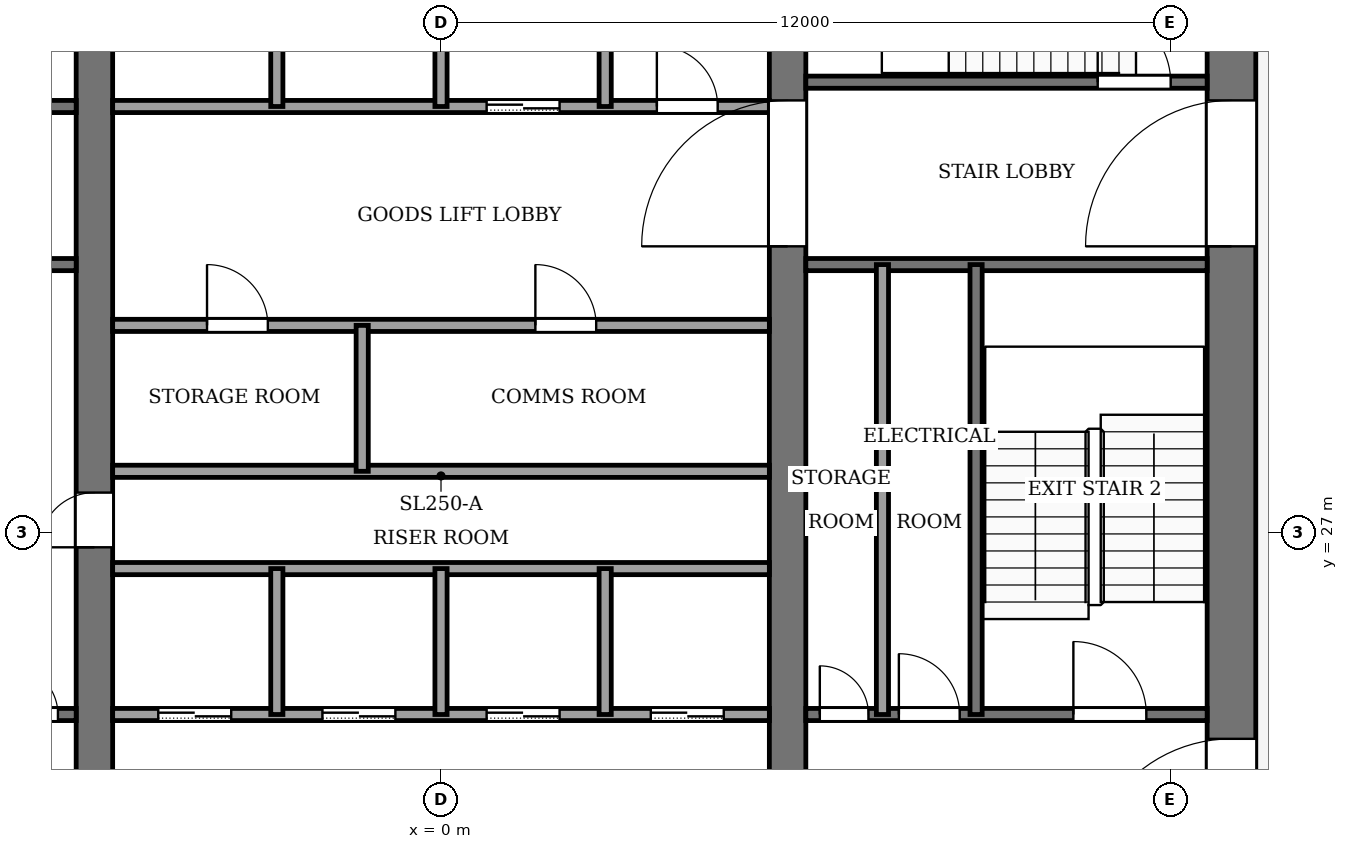
"""IFC4 building model, lengths in metres.
Left out: names, types, materials, properties, quantities, classifications, styles, units other than length and angle.
Written with IfcOpenShell. Run it as: python <this file> out.ifc"""

import sys

from ifc_helpers import new_model, si_unit, direction, frame, frame_2d, origin, place, context, subcontext, project, spatial, rectangle, extrude, element, fill, save


model = new_model("IFC4")
c1 = context("Model", 3, precision=1e-05, world=origin(), true_north=direction((0.0, 1.0)))
c2 = subcontext(c1, "Body", "Model", "MODEL_VIEW")
j1 = project(units=[si_unit("LENGTHUNIT", "METRE"), si_unit("PLANEANGLEUNIT", "RADIAN")], contexts=[c1])
p1 = place(None, origin())
s1 = spatial("IfcSite", under=j1, at=p1, CompositionType="ELEMENT")
p2 = place(p1, origin())
s2 = spatial("IfcBuilding", under=s1, at=p2, CompositionType="ELEMENT")
p3 = place(p2, frame((0.0, 0.0, 254.0)))
s3 = spatial("IfcBuildingStorey", under=s2, at=p3, CompositionType="ELEMENT", Elevation=254.0)
p4 = place(p3, frame((13.0, 18.4, -0.13), z_axis=(0.0, 0.0, 1.0), x_axis=(0.0, 1.0, 0.0)))
e1 = element("IfcWall", 1, at=p4, inside=s3, PredefinedType="SHEAR", context=c2, shape_type="SweptSolid", body=[
    extrude(rectangle(XDim=19.2, YDim=0.8, at=frame_2d((9.6, 0.0))), origin(), (0.0, 0.0, 1.0), 4.0),
])
p5 = place(p4, frame((2.8, 0.0, 0.13)))
e2 = element("IfcOpeningElement", 2, at=p5, cuts=e1, PredefinedType="OPENING", context=c2, shape_type="SweptSolid", body=[
    extrude(rectangle(XDim=2.4, YDim=2.4, at=frame_2d((1.2, 1.2))), frame((0.0, 0.41, 0.0), z_axis=(0.0, -1.0, 0.0), x_axis=(1.0, 0.0, 0.0)), (0.0, 0.0, 1.0), 0.82),
])
p6 = place(p4, frame((13.3, 0.0, 0.13)))
e3 = element("IfcOpeningElement", 3, at=p6, cuts=e1, PredefinedType="OPENING", context=c2, shape_type="SweptSolid", body=[
    extrude(rectangle(XDim=2.4, YDim=2.4, at=frame_2d((1.2, 1.2))), frame((0.0, 0.41, 0.0), z_axis=(0.0, -1.0, 0.0), x_axis=(1.0, 0.0, 0.0)), (0.0, 0.0, 1.0), 0.82),
])
p7 = place(p3, frame((-5.7, 18.4, -0.13), z_axis=(0.0, 0.0, 1.0), x_axis=(0.0, 1.0, 0.0)))
e4 = element("IfcWall", 4, at=p7, inside=s3, PredefinedType="SHEAR", context=c2, shape_type="SweptSolid", body=[
    extrude(rectangle(XDim=19.2, YDim=0.6, at=frame_2d((9.6, 0.0))), origin(), (0.0, 0.0, 1.0), 4.0),
])
p8 = place(p7, frame((8.35, 0.0, 0.13)))
e5 = element("IfcOpeningElement", 5, at=p8, cuts=e4, PredefinedType="OPENING", context=c2, shape_type="SweptSolid", body=[
    extrude(rectangle(XDim=0.9, YDim=2.1, at=frame_2d((0.45, 1.05))), frame((0.0, 0.31, 0.0), z_axis=(0.0, -1.0, 0.0), x_axis=(1.0, 0.0, 0.0)), (0.0, 0.0, 1.0), 0.62),
])
p9 = place(p3, frame((5.7, 18.4, -0.13), z_axis=(0.0, 0.0, 1.0), x_axis=(0.0, 1.0, 0.0)))
e6 = element("IfcWall", 6, at=p9, inside=s3, PredefinedType="SHEAR", context=c2, shape_type="SweptSolid", body=[
    extrude(rectangle(XDim=19.2, YDim=0.6, at=frame_2d((9.6, 0.0))), origin(), (0.0, 0.0, 1.0), 4.0),
])
p10 = place(p9, frame((13.3, 0.0, 0.13)))
e7 = element("IfcOpeningElement", 7, at=p10, cuts=e6, PredefinedType="OPENING", context=c2, shape_type="SweptSolid", body=[
    extrude(rectangle(XDim=2.4, YDim=2.4, at=frame_2d((1.2, 1.2))), frame((0.0, 0.31, 0.0), z_axis=(0.0, -1.0, 0.0), x_axis=(1.0, 0.0, 0.0)), (0.0, 0.0, 1.0), 0.62),
])
p11 = place(p3, frame((-12.6, 24.0, 0.0), z_axis=(0.0, 0.0, 1.0), x_axis=(1.0, 0.0, 0.0)))
e8 = element("IfcWall", 8, at=p11, inside=s3, PredefinedType="PARTITIONING", context=c2, shape_type="SweptSolid", body=[
    extrude(rectangle(XDim=6.6, YDim=0.2, at=frame_2d((3.3, 0.0))), origin(), (0.0, 0.0, 1.0), 3.87),
])
p12 = place(p11, frame((4.1, 0.0, 0.0)))
e9 = element("IfcOpeningElement", 9, at=p12, cuts=e8, PredefinedType="OPENING", context=c2, shape_type="SweptSolid", body=[
    extrude(rectangle(XDim=0.8, YDim=2.1, at=frame_2d((0.4, 1.05))), frame((0.0, 0.11, 0.0), z_axis=(0.0, -1.0, 0.0), x_axis=(1.0, 0.0, 0.0)), (0.0, 0.0, 1.0), 0.22),
])
p13 = place(p11, frame((5.5, 0.0, 0.0)))
e10 = element("IfcOpeningElement", 10, at=p13, cuts=e8, PredefinedType="OPENING", context=c2, shape_type="SweptSolid", body=[
    extrude(rectangle(XDim=0.8, YDim=2.1, at=frame_2d((0.4, 1.05))), frame((0.0, 0.11, 0.0), z_axis=(0.0, -1.0, 0.0), x_axis=(1.0, 0.0, 0.0)), (0.0, 0.0, 1.0), 0.22),
])
p14 = place(p3, frame((-5.4, 24.0, 0.0), z_axis=(0.0, 0.0, 1.0), x_axis=(1.0, 0.0, 0.0)))
e11 = element("IfcWall", 11, at=p14, inside=s3, PredefinedType="PARTITIONING", context=c2, shape_type="SweptSolid", body=[
    extrude(rectangle(XDim=10.8, YDim=0.2, at=frame_2d((5.4, 0.0))), origin(), (0.0, 0.0, 1.0), 3.87),
])
p15 = place(p14, frame((0.75, 0.0, 0.0)))
e12 = element("IfcOpeningElement", 12, at=p15, cuts=e11, PredefinedType="OPENING", context=c2, shape_type="SweptSolid", body=[
    extrude(rectangle(XDim=1.2, YDim=2.2, at=frame_2d((0.6, 1.1))), frame((0.0, 0.11, 0.0), z_axis=(0.0, -1.0, 0.0), x_axis=(1.0, 0.0, 0.0)), (0.0, 0.0, 1.0), 0.22),
])
p16 = place(p14, frame((3.45, 0.0, 0.0)))
e13 = element("IfcOpeningElement", 13, at=p16, cuts=e11, PredefinedType="OPENING", context=c2, shape_type="SweptSolid", body=[
    extrude(rectangle(XDim=1.2, YDim=2.2, at=frame_2d((0.6, 1.1))), frame((0.0, 0.11, 0.0), z_axis=(0.0, -1.0, 0.0), x_axis=(1.0, 0.0, 0.0)), (0.0, 0.0, 1.0), 0.22),
])
p17 = place(p14, frame((6.15, 0.0, 0.0)))
e14 = element("IfcOpeningElement", 14, at=p17, cuts=e11, PredefinedType="OPENING", context=c2, shape_type="SweptSolid", body=[
    extrude(rectangle(XDim=1.2, YDim=2.2, at=frame_2d((0.6, 1.1))), frame((0.0, 0.11, 0.0), z_axis=(0.0, -1.0, 0.0), x_axis=(1.0, 0.0, 0.0)), (0.0, 0.0, 1.0), 0.22),
])
p18 = place(p14, frame((8.85, 0.0, 0.0)))
e15 = element("IfcOpeningElement", 15, at=p18, cuts=e11, PredefinedType="OPENING", context=c2, shape_type="SweptSolid", body=[
    extrude(rectangle(XDim=1.2, YDim=2.2, at=frame_2d((0.6, 1.1))), frame((0.0, 0.11, 0.0), z_axis=(0.0, -1.0, 0.0), x_axis=(1.0, 0.0, 0.0)), (0.0, 0.0, 1.0), 0.22),
])
p19 = place(p3, frame((6.0, 24.0, 0.0), z_axis=(0.0, 0.0, 1.0), x_axis=(1.0, 0.0, 0.0)))
e16 = element("IfcWall", 16, at=p19, inside=s3, PredefinedType="PARTITIONING", context=c2, shape_type="SweptSolid", body=[
    extrude(rectangle(XDim=6.6, YDim=0.2, at=frame_2d((3.3, 0.0))), origin(), (0.0, 0.0, 1.0), 3.87),
])
p20 = place(p19, frame((0.23, 0.0, 0.0)))
e17 = element("IfcOpeningElement", 17, at=p20, cuts=e16, PredefinedType="OPENING", context=c2, shape_type="SweptSolid", body=[
    extrude(rectangle(XDim=0.8, YDim=2.1, at=frame_2d((0.4, 1.05))), frame((0.0, 0.11, 0.0), z_axis=(0.0, -1.0, 0.0), x_axis=(1.0, 0.0, 0.0)), (0.0, 0.0, 1.0), 0.22),
])
p21 = place(p19, frame((1.53, 0.0, 0.0)))
e18 = element("IfcOpeningElement", 18, at=p21, cuts=e16, PredefinedType="OPENING", context=c2, shape_type="SweptSolid", body=[
    extrude(rectangle(XDim=1.0, YDim=2.1, at=frame_2d((0.5, 1.05))), frame((0.0, 0.11, 0.0), z_axis=(0.0, -1.0, 0.0), x_axis=(1.0, 0.0, 0.0)), (0.0, 0.0, 1.0), 0.22),
])
p22 = place(p19, frame((4.4, 0.0, 0.0)))
e19 = element("IfcOpeningElement", 19, at=p22, cuts=e16, PredefinedType="OPENING", context=c2, shape_type="SweptSolid", body=[
    extrude(rectangle(XDim=1.2, YDim=2.2, at=frame_2d((0.6, 1.1))), frame((0.0, 0.11, 0.0), z_axis=(0.0, -1.0, 0.0), x_axis=(1.0, 0.0, 0.0)), (0.0, 0.0, 1.0), 0.22),
])
for number, where, z_axis, x_axis in (
    (20, (-5.4, 26.4, 0.0), (0.0, 0.0, 1.0), (1.0, 0.0, 0.0)),
    (21, (-5.4, 28.0, 0.0), (0.0, 0.0, 1.0), (1.0, 0.0, 0.0)),
):
    element("IfcWall", number, at=place(p3, frame(where, z_axis=z_axis, x_axis=x_axis)), inside=s3, PredefinedType="PARTITIONING", context=c2, shape_type="SweptSolid", body=[
        extrude(rectangle(XDim=10.8, YDim=0.2, at=frame_2d((5.4, 0.0))), origin(), (0.0, 0.0, 1.0), 3.87),
    ])
p23 = place(p3, frame((-5.4, 30.4, 0.0), z_axis=(0.0, 0.0, 1.0), x_axis=(1.0, 0.0, 0.0)))
e22 = element("IfcWall", 22, at=p23, inside=s3, PredefinedType="PARTITIONING", context=c2, shape_type="SweptSolid", body=[
    extrude(rectangle(XDim=10.8, YDim=0.2, at=frame_2d((5.4, 0.0))), origin(), (0.0, 0.0, 1.0), 3.87),
])
p24 = place(p23, frame((1.552, 0.0, 0.0)))
e23 = element("IfcOpeningElement", 23, at=p24, cuts=e22, PredefinedType="OPENING", context=c2, shape_type="SweptSolid", body=[
    extrude(rectangle(XDim=1.0, YDim=2.1, at=frame_2d((0.5, 1.05))), frame((0.0, 0.11, 0.0), z_axis=(0.0, -1.0, 0.0), x_axis=(1.0, 0.0, 0.0)), (0.0, 0.0, 1.0), 0.22),
])
p25 = place(p23, frame((6.952, 0.0, 0.0)))
e24 = element("IfcOpeningElement", 24, at=p25, cuts=e22, PredefinedType="OPENING", context=c2, shape_type="SweptSolid", body=[
    extrude(rectangle(XDim=1.0, YDim=2.1, at=frame_2d((0.5, 1.05))), frame((0.0, 0.11, 0.0), z_axis=(0.0, -1.0, 0.0), x_axis=(1.0, 0.0, 0.0)), (0.0, 0.0, 1.0), 0.22),
])
p26 = place(p3, frame((-12.6, 31.4, 0.0), z_axis=(0.0, 0.0, 1.0), x_axis=(1.0, 0.0, 0.0)))
e25 = element("IfcWall", 25, at=p26, inside=s3, PredefinedType="PARTITIONING", context=c2, shape_type="SweptSolid", body=[
    extrude(rectangle(XDim=6.6, YDim=0.2, at=frame_2d((3.3, 0.0))), origin(), (0.0, 0.0, 1.0), 3.87),
])
p27 = place(p26, frame((1.0, 0.0, 0.0)))
e26 = element("IfcOpeningElement", 26, at=p27, cuts=e25, PredefinedType="OPENING", context=c2, shape_type="SweptSolid", body=[
    extrude(rectangle(XDim=1.2, YDim=2.2, at=frame_2d((0.6, 1.1))), frame((0.0, 0.11, 0.0), z_axis=(0.0, -1.0, 0.0), x_axis=(1.0, 0.0, 0.0)), (0.0, 0.0, 1.0), 0.22),
])
p28 = place(p3, frame((6.0, 31.4, 0.0), z_axis=(0.0, 0.0, 1.0), x_axis=(1.0, 0.0, 0.0)))
e27 = element("IfcWall", 27, at=p28, inside=s3, PredefinedType="PARTITIONING", context=c2, shape_type="SweptSolid", body=[
    extrude(rectangle(XDim=6.6, YDim=0.2, at=frame_2d((3.3, 0.0))), origin(), (0.0, 0.0, 1.0), 3.87),
])
p29 = place(p3, frame((-12.6, 34.0, 0.0), z_axis=(0.0, 0.0, 1.0), x_axis=(1.0, 0.0, 0.0)))
e28 = element("IfcWall", 28, at=p29, inside=s3, PredefinedType="PARTITIONING", context=c2, shape_type="SweptSolid", body=[
    extrude(rectangle(XDim=6.6, YDim=0.2, at=frame_2d((3.3, 0.0))), origin(), (0.0, 0.0, 1.0), 3.87),
])
p30 = place(p29, frame((4.7, 0.0, 0.0)))
e29 = element("IfcOpeningElement", 29, at=p30, cuts=e28, PredefinedType="OPENING", context=c2, shape_type="SweptSolid", body=[
    extrude(rectangle(XDim=1.4, YDim=2.2, at=frame_2d((0.7, 1.1))), frame((0.0, 0.11, 0.0), z_axis=(0.0, -1.0, 0.0), x_axis=(1.0, 0.0, 0.0)), (0.0, 0.0, 1.0), 0.22),
])
p31 = place(p29, frame((2.3, 0.0, 0.0)))
e30 = element("IfcOpeningElement", 30, at=p31, cuts=e28, PredefinedType="OPENING", context=c2, shape_type="SweptSolid", body=[
    extrude(rectangle(XDim=1.4, YDim=2.2, at=frame_2d((0.7, 1.1))), frame((0.0, 0.11, 0.0), z_axis=(0.0, -1.0, 0.0), x_axis=(1.0, 0.0, 0.0)), (0.0, 0.0, 1.0), 0.22),
])
p32 = place(p29, frame((0.45, 0.0, 0.0)))
e31 = element("IfcOpeningElement", 31, at=p32, cuts=e28, PredefinedType="OPENING", context=c2, shape_type="SweptSolid", body=[
    extrude(rectangle(XDim=0.9, YDim=2.1, at=frame_2d((0.45, 1.05))), frame((0.0, 0.11, 0.0), z_axis=(0.0, -1.0, 0.0), x_axis=(1.0, 0.0, 0.0)), (0.0, 0.0, 1.0), 0.22),
])
p33 = place(p3, frame((-5.4, 34.0, 0.0), z_axis=(0.0, 0.0, 1.0), x_axis=(1.0, 0.0, 0.0)))
e32 = element("IfcWall", 32, at=p33, inside=s3, PredefinedType="PARTITIONING", context=c2, shape_type="SweptSolid", body=[
    extrude(rectangle(XDim=10.8, YDim=0.2, at=frame_2d((5.4, 0.0))), origin(), (0.0, 0.0, 1.0), 3.87),
])
p34 = place(p33, frame((6.15, 0.0, 0.0)))
e33 = element("IfcOpeningElement", 33, at=p34, cuts=e32, PredefinedType="OPENING", context=c2, shape_type="SweptSolid", body=[
    extrude(rectangle(XDim=1.2, YDim=2.2, at=frame_2d((0.6, 1.1))), frame((0.0, 0.11, 0.0), z_axis=(0.0, -1.0, 0.0), x_axis=(1.0, 0.0, 0.0)), (0.0, 0.0, 1.0), 0.22),
])
p35 = place(p33, frame((8.95, 0.0, 0.0)))
e34 = element("IfcOpeningElement", 34, at=p35, cuts=e32, PredefinedType="OPENING", context=c2, shape_type="SweptSolid", body=[
    extrude(rectangle(XDim=1.0, YDim=2.1, at=frame_2d((0.5, 1.05))), frame((0.0, 0.11, 0.0), z_axis=(0.0, -1.0, 0.0), x_axis=(1.0, 0.0, 0.0)), (0.0, 0.0, 1.0), 0.22),
])
p36 = place(p3, frame((6.0, 34.4, 0.0), z_axis=(0.0, 0.0, 1.0), x_axis=(1.0, 0.0, 0.0)))
e35 = element("IfcWall", 35, at=p36, inside=s3, PredefinedType="PARTITIONING", context=c2, shape_type="SweptSolid", body=[
    extrude(rectangle(XDim=6.6, YDim=0.2, at=frame_2d((3.3, 0.0))), origin(), (0.0, 0.0, 1.0), 3.87),
])
p37 = place(p36, frame((4.8, 0.0, 0.0)))
e36 = element("IfcOpeningElement", 36, at=p37, cuts=e35, PredefinedType="OPENING", context=c2, shape_type="SweptSolid", body=[
    extrude(rectangle(XDim=1.2, YDim=2.2, at=frame_2d((0.6, 1.1))), frame((0.0, 0.11, 0.0), z_axis=(0.0, -1.0, 0.0), x_axis=(1.0, 0.0, 0.0)), (0.0, 0.0, 1.0), 0.22),
])
p38 = place(p3, frame((-2.7, 24.0, 0.0), z_axis=(0.0, 0.0, 1.0), x_axis=(0.0, 1.0, 0.0)))
e37 = element("IfcWall", 37, at=p38, inside=s3, PredefinedType="PARTITIONING", context=c2, shape_type="SweptSolid", body=[
    extrude(rectangle(XDim=2.4, YDim=0.2, at=frame_2d((1.2, 0.0))), origin(), (0.0, 0.0, 1.0), 3.87),
])
p39 = place(p3, frame((-2.7, 34.0, 0.0), z_axis=(0.0, 0.0, 1.0), x_axis=(0.0, 1.0, 0.0)))
e38 = element("IfcWall", 38, at=p39, inside=s3, PredefinedType="PARTITIONING", context=c2, shape_type="SweptSolid", body=[
    extrude(rectangle(XDim=3.6, YDim=0.2, at=frame_2d((1.8, 0.0))), origin(), (0.0, 0.0, 1.0), 3.87),
])
for number, where, z_axis, x_axis in (
    (39, (-1.296, 28.0, 0.0), (0.0, 0.0, 1.0), (0.0, 1.0, 0.0)),
    (40, (0.0, 24.0, 0.0), (0.0, 0.0, 1.0), (0.0, 1.0, 0.0)),
):
    element("IfcWall", number, at=place(p3, frame(where, z_axis=z_axis, x_axis=x_axis)), inside=s3, PredefinedType="PARTITIONING", context=c2, shape_type="SweptSolid", body=[
        extrude(rectangle(XDim=2.4, YDim=0.2, at=frame_2d((1.2, 0.0))), origin(), (0.0, 0.0, 1.0), 3.87),
    ])
p40 = place(p3, frame((0.0, 34.0, 0.0), z_axis=(0.0, 0.0, 1.0), x_axis=(0.0, 1.0, 0.0)))
e41 = element("IfcWall", 41, at=p40, inside=s3, PredefinedType="PARTITIONING", context=c2, shape_type="SweptSolid", body=[
    extrude(rectangle(XDim=3.6, YDim=0.2, at=frame_2d((1.8, 0.0))), origin(), (0.0, 0.0, 1.0), 3.87),
])
p41 = place(p3, frame((2.7, 24.0, 0.0), z_axis=(0.0, 0.0, 1.0), x_axis=(0.0, 1.0, 0.0)))
e42 = element("IfcWall", 42, at=p41, inside=s3, PredefinedType="PARTITIONING", context=c2, shape_type="SweptSolid", body=[
    extrude(rectangle(XDim=2.4, YDim=0.2, at=frame_2d((1.2, 0.0))), origin(), (0.0, 0.0, 1.0), 3.87),
])
p42 = place(p3, frame((2.7, 34.0, 0.0), z_axis=(0.0, 0.0, 1.0), x_axis=(0.0, 1.0, 0.0)))
e43 = element("IfcWall", 43, at=p42, inside=s3, PredefinedType="PARTITIONING", context=c2, shape_type="SweptSolid", body=[
    extrude(rectangle(XDim=3.6, YDim=0.2, at=frame_2d((1.8, 0.0))), origin(), (0.0, 0.0, 1.0), 3.87),
])
for number, where, z_axis, x_axis in (
    (44, (7.26, 24.0, 0.0), (0.0, 0.0, 1.0), (0.0, 1.0, 0.0)),
    (45, (8.8, 24.0, 0.0), (0.0, 0.0, 1.0), (0.0, 1.0, 0.0)),
):
    element("IfcWall", number, at=place(p3, frame(where, z_axis=z_axis, x_axis=x_axis)), inside=s3, PredefinedType="PARTITIONING", context=c2, shape_type="SweptSolid", body=[
        extrude(rectangle(XDim=7.4, YDim=0.2, at=frame_2d((3.7, 0.0))), origin(), (0.0, 0.0, 1.0), 3.87),
    ])
p43 = place(p15, origin())
e46 = element("IfcDoor", 46, at=p43, inside=s3, OperationType="SLIDING_TO_LEFT", PredefinedType="DOOR", context=c2, shape_type="SweptSolid", body=[
    extrude(rectangle(XDim=1.2, YDim=2.2, at=frame_2d((0.6, 1.1))), frame((0.0, 0.025, 0.0), z_axis=(0.0, -1.0, 0.0), x_axis=(1.0, 0.0, 0.0)), (0.0, 0.0, 1.0), 0.05),
])
fill(e12, e46)
p44 = place(p16, origin())
e47 = element("IfcDoor", 47, at=p44, inside=s3, OperationType="SLIDING_TO_LEFT", PredefinedType="DOOR", context=c2, shape_type="SweptSolid", body=[
    extrude(rectangle(XDim=1.2, YDim=2.2, at=frame_2d((0.6, 1.1))), frame((0.0, 0.025, 0.0), z_axis=(0.0, -1.0, 0.0), x_axis=(1.0, 0.0, 0.0)), (0.0, 0.0, 1.0), 0.05),
])
fill(e13, e47)
p45 = place(p17, origin())
e48 = element("IfcDoor", 48, at=p45, inside=s3, OperationType="SLIDING_TO_LEFT", PredefinedType="DOOR", context=c2, shape_type="SweptSolid", body=[
    extrude(rectangle(XDim=1.2, YDim=2.2, at=frame_2d((0.6, 1.1))), frame((0.0, 0.025, 0.0), z_axis=(0.0, -1.0, 0.0), x_axis=(1.0, 0.0, 0.0)), (0.0, 0.0, 1.0), 0.05),
])
fill(e14, e48)
p46 = place(p18, origin())
e49 = element("IfcDoor", 49, at=p46, inside=s3, OperationType="SLIDING_TO_LEFT", PredefinedType="DOOR", context=c2, shape_type="SweptSolid", body=[
    extrude(rectangle(XDim=1.2, YDim=2.2, at=frame_2d((0.6, 1.1))), frame((0.0, 0.025, 0.0), z_axis=(0.0, -1.0, 0.0), x_axis=(1.0, 0.0, 0.0)), (0.0, 0.0, 1.0), 0.05),
])
fill(e15, e49)
p47 = place(p34, origin())
e50 = element("IfcDoor", 50, at=p47, inside=s3, OperationType="SLIDING_TO_LEFT", PredefinedType="DOOR", context=c2, shape_type="SweptSolid", body=[
    extrude(rectangle(XDim=1.2, YDim=2.2, at=frame_2d((0.6, 1.1))), frame((0.0, 0.025, 0.0), z_axis=(0.0, -1.0, 0.0), x_axis=(1.0, 0.0, 0.0)), (0.0, 0.0, 1.0), 0.05),
])
fill(e33, e50)
p48 = place(p24, origin())
e51 = element("IfcDoor", 51, at=p48, inside=s3, OperationType="SINGLE_SWING_LEFT", PredefinedType="DOOR", context=c2, shape_type="SweptSolid", body=[
    extrude(rectangle(XDim=1.0, YDim=2.1, at=frame_2d((0.5, 1.05))), frame((0.0, 0.025, 0.0), z_axis=(0.0, -1.0, 0.0), x_axis=(1.0, 0.0, 0.0)), (0.0, 0.0, 1.0), 0.05),
])
fill(e23, e51)
p49 = place(p25, origin())
e52 = element("IfcDoor", 52, at=p49, inside=s3, OperationType="SINGLE_SWING_RIGHT", PredefinedType="DOOR", context=c2, shape_type="SweptSolid", body=[
    extrude(rectangle(XDim=1.0, YDim=2.1, at=frame_2d((0.5, 1.05))), frame((0.0, 0.025, 0.0), z_axis=(0.0, -1.0, 0.0), x_axis=(1.0, 0.0, 0.0)), (0.0, 0.0, 1.0), 0.05),
])
fill(e24, e52)
p50 = place(p13, origin())
e53 = element("IfcDoor", 53, at=p50, inside=s3, OperationType="SINGLE_SWING_RIGHT", PredefinedType="DOOR", context=c2, shape_type="SweptSolid", body=[
    extrude(rectangle(XDim=0.8, YDim=2.1, at=frame_2d((0.4, 1.05))), frame((0.0, 0.025, 0.0), z_axis=(0.0, -1.0, 0.0), x_axis=(1.0, 0.0, 0.0)), (0.0, 0.0, 1.0), 0.05),
])
fill(e10, e53)
p51 = place(p20, origin())
e54 = element("IfcDoor", 54, at=p51, inside=s3, OperationType="SINGLE_SWING_RIGHT", PredefinedType="DOOR", context=c2, shape_type="SweptSolid", body=[
    extrude(rectangle(XDim=0.8, YDim=2.1, at=frame_2d((0.4, 1.05))), frame((0.0, 0.025, 0.0), z_axis=(0.0, -1.0, 0.0), x_axis=(1.0, 0.0, 0.0)), (0.0, 0.0, 1.0), 0.05),
])
fill(e17, e54)
p52 = place(p21, origin())
e55 = element("IfcDoor", 55, at=p52, inside=s3, OperationType="SINGLE_SWING_LEFT", PredefinedType="DOOR", context=c2, shape_type="SweptSolid", body=[
    extrude(rectangle(XDim=1.0, YDim=2.1, at=frame_2d((0.5, 1.05))), frame((0.0, 0.025, 0.0), z_axis=(0.0, -1.0, 0.0), x_axis=(1.0, 0.0, 0.0)), (0.0, 0.0, 1.0), 0.05),
])
fill(e18, e55)
p53 = place(p35, origin())
e56 = element("IfcDoor", 56, at=p53, inside=s3, OperationType="SINGLE_SWING_LEFT", PredefinedType="DOOR", context=c2, shape_type="SweptSolid", body=[
    extrude(rectangle(XDim=1.0, YDim=2.1, at=frame_2d((0.5, 1.05))), frame((0.0, 0.025, 0.0), z_axis=(0.0, -1.0, 0.0), x_axis=(1.0, 0.0, 0.0)), (0.0, 0.0, 1.0), 0.05),
])
fill(e34, e56)
p54 = place(p8, origin())
e57 = element("IfcDoor", 57, at=p54, inside=s3, OperationType="SINGLE_SWING_RIGHT", PredefinedType="DOOR", context=c2, shape_type="SweptSolid", body=[
    extrude(rectangle(XDim=0.9, YDim=2.1, at=frame_2d((0.45, 1.05))), frame((0.0, 0.025, 0.0), z_axis=(0.0, -1.0, 0.0), x_axis=(1.0, 0.0, 0.0)), (0.0, 0.0, 1.0), 0.05),
])
fill(e5, e57)
p55 = place(p22, origin())
e58 = element("IfcDoor", 58, at=p55, inside=s3, OperationType="SINGLE_SWING_LEFT", PredefinedType="DOOR", context=c2, shape_type="SweptSolid", body=[
    extrude(rectangle(XDim=1.2, YDim=2.2, at=frame_2d((0.6, 1.1))), frame((0.0, 0.025, 0.0), z_axis=(0.0, -1.0, 0.0), x_axis=(1.0, 0.0, 0.0)), (0.0, 0.0, 1.0), 0.05),
])
fill(e19, e58)
p56 = place(p37, origin())
e59 = element("IfcDoor", 59, at=p56, inside=s3, OperationType="SINGLE_SWING_RIGHT", PredefinedType="DOOR", context=c2, shape_type="SweptSolid", body=[
    extrude(rectangle(XDim=1.2, YDim=2.2, at=frame_2d((0.6, 1.1))), frame((0.0, 0.025, 0.0), z_axis=(0.0, -1.0, 0.0), x_axis=(1.0, 0.0, 0.0)), (0.0, 0.0, 1.0), 0.05),
])
fill(e36, e59)
p57 = place(p10, origin())
e60 = element("IfcDoor", 60, at=p57, inside=s3, OperationType="DOUBLE_DOOR_SINGLE_SWING", PredefinedType="DOOR", context=c2, shape_type="SweptSolid", body=[
    extrude(rectangle(XDim=2.4, YDim=2.4, at=frame_2d((1.2, 1.2))), frame((0.0, 0.025, 0.0), z_axis=(0.0, -1.0, 0.0), x_axis=(1.0, 0.0, 0.0)), (0.0, 0.0, 1.0), 0.05),
])
fill(e7, e60)
p58 = place(p5, origin())
e61 = element("IfcDoor", 61, at=p58, inside=s3, OperationType="DOUBLE_DOOR_SINGLE_SWING", PredefinedType="DOOR", context=c2, shape_type="SweptSolid", body=[
    extrude(rectangle(XDim=2.4, YDim=2.4, at=frame_2d((1.2, 1.2))), frame((0.0, 0.025, 0.0), z_axis=(0.0, -1.0, 0.0), x_axis=(1.0, 0.0, 0.0)), (0.0, 0.0, 1.0), 0.05),
])
fill(e2, e61)
p59 = place(p6, origin())
e62 = element("IfcDoor", 62, at=p59, inside=s3, OperationType="DOUBLE_DOOR_SINGLE_SWING", PredefinedType="DOOR", context=c2, shape_type="SweptSolid", body=[
    extrude(rectangle(XDim=2.4, YDim=2.4, at=frame_2d((1.2, 1.2))), frame((0.0, 0.025, 0.0), z_axis=(0.0, -1.0, 0.0), x_axis=(1.0, 0.0, 0.0)), (0.0, 0.0, 1.0), 0.05),
])
fill(e3, e62)
save(model, sys.argv[1])
